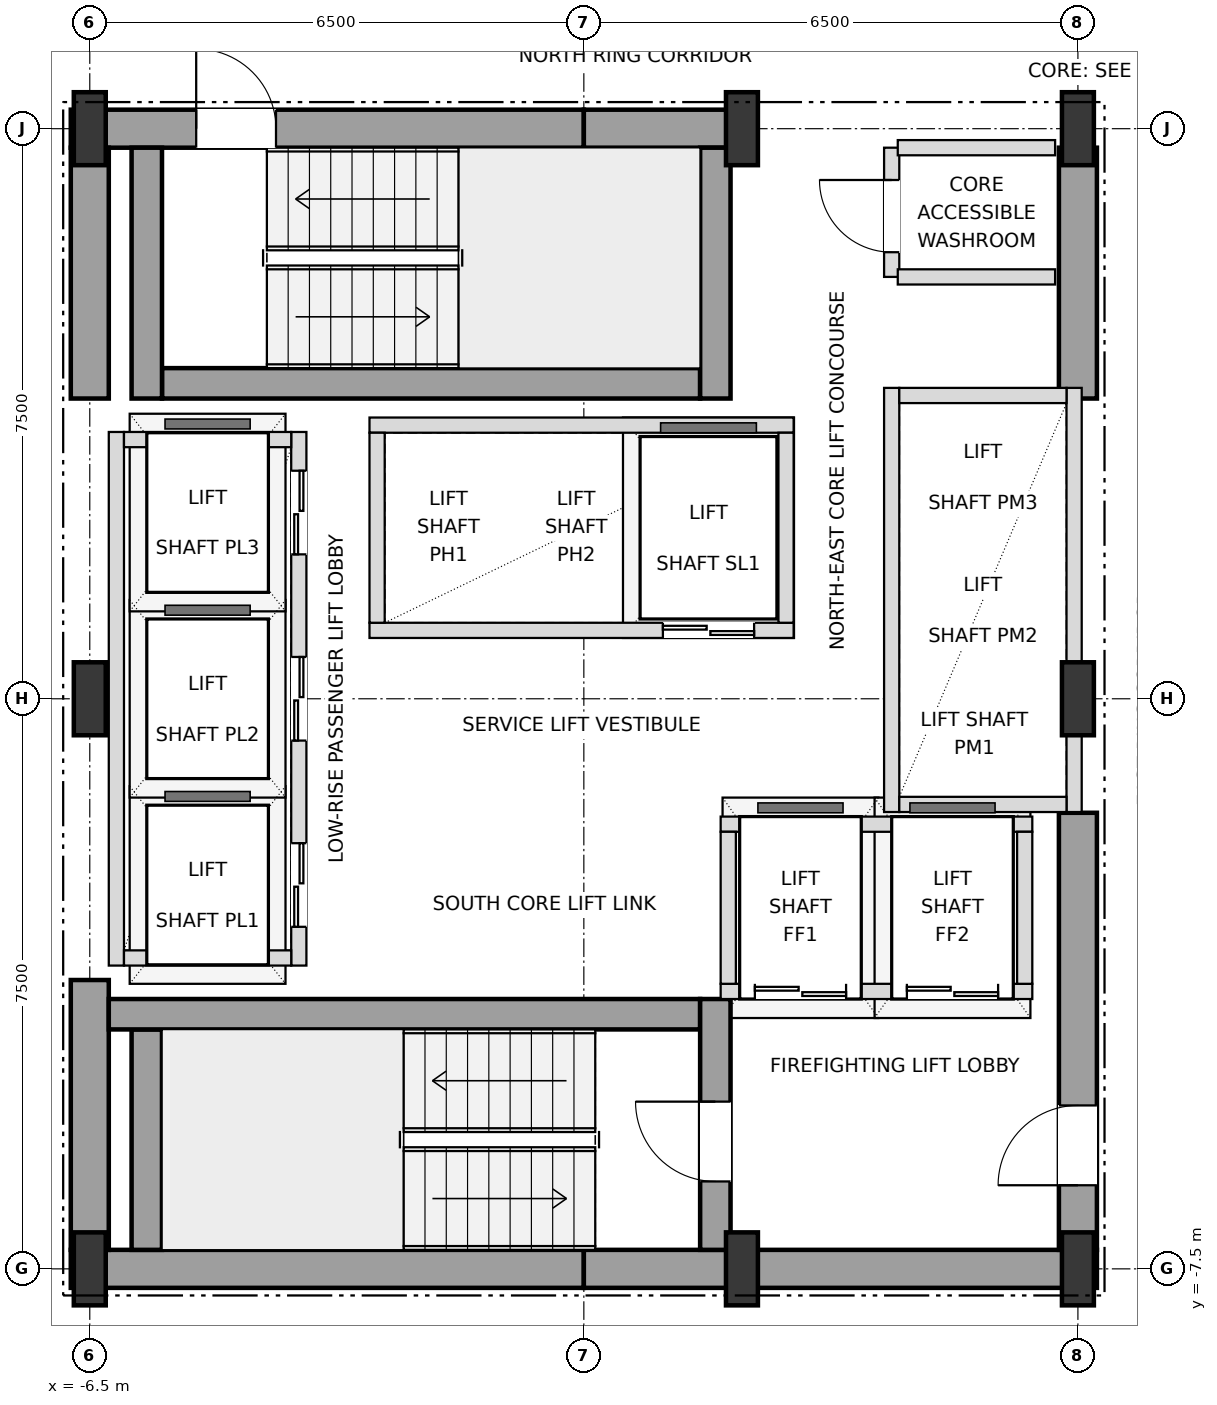
"""IFC4 building model, lengths in metres.
Left out: names, types, materials, properties, quantities, classifications, styles, units other than length and angle.
Written with IfcOpenShell. Run it as: python <this file> out.ifc"""

import sys

from ifc_helpers import new_model, si_unit, direction, frame, frame_2d, origin, origin_2d, place, context, subcontext, project, spatial, rectangle, i_section, extrude, element, fill, save


model = new_model("IFC4")
c1 = context("Model", 3, precision=1e-05, world=origin(), true_north=direction((0.0, 1.0)))
c2 = subcontext(c1, "Body", "Model", "MODEL_VIEW")
j1 = project(units=[si_unit("LENGTHUNIT", "METRE"), si_unit("PLANEANGLEUNIT", "RADIAN")], contexts=[c1])
p1 = place(None, origin())
s1 = spatial("IfcSite", under=j1, at=p1, CompositionType="ELEMENT")
p2 = place(p1, origin())
s2 = spatial("IfcBuilding", under=s1, at=p2, CompositionType="ELEMENT")
p3 = place(p2, frame((0.0, 0.0, 117.0)))
s3 = spatial("IfcBuildingStorey", under=s2, at=p3, CompositionType="ELEMENT", Elevation=117.0)
for number, where, z_axis, x_axis in (
    (1, (-6.5, -7.5, 0.0), (0.0, 0.0, 1.0), (1.0, 0.0, 0.0)),
    (2, (2.08, -7.5, 0.0), (0.0, 0.0, 1.0), (1.0, 0.0, 0.0)),
    (3, (6.5, -7.5, 0.0), (0.0, 0.0, 1.0), (1.0, 0.0, 0.0)),
    (4, (-6.5, 0.0, 0.0), (0.0, 0.0, 1.0), (1.0, 0.0, 0.0)),
    (5, (6.5, 0.0, 0.0), (0.0, 0.0, 1.0), (1.0, 0.0, 0.0)),
    (6, (-6.5, 7.5, 0.0), (0.0, 0.0, 1.0), (1.0, 0.0, 0.0)),
    (7, (2.08, 7.5, 0.0), (0.0, 0.0, 1.0), (1.0, 0.0, 0.0)),
    (8, (6.5, 7.5, 0.0), (0.0, 0.0, 1.0), (1.0, 0.0, 0.0)),
):
    element("IfcColumn", number, at=place(p3, frame(where, z_axis=z_axis, x_axis=x_axis)), inside=s3, PredefinedType="COLUMN", context=c2, shape_type="SweptSolid", body=[
        extrude(i_section(OverallWidth=0.42, OverallDepth=0.96, WebThickness=0.022, FlangeThickness=0.034, at=origin_2d()), origin(), (0.0, 0.0, 1.0), 3.6),
    ])
for number, where, z_axis, x_axis in (
    (9, (-6.75, -7.5, 0.0), (0.0, 0.0, 1.0), (1.0, 0.0, 0.0)),
    (10, (0.0, -7.5, 0.0), (0.0, 0.0, 1.0), (1.0, 0.0, 0.0)),
):
    element("IfcWall", number, at=place(p3, frame(where, z_axis=z_axis, x_axis=x_axis)), inside=s3, PredefinedType="SHEAR", context=c2, shape_type="SweptSolid", body=[
        extrude(rectangle(XDim=6.75, YDim=0.5, at=frame_2d((3.375, 0.0))), origin(), (0.0, 0.0, 1.0), 3.3),
    ])
p4 = place(p3, frame((-6.75, 7.5, 0.0), z_axis=(0.0, 0.0, 1.0), x_axis=(1.0, 0.0, 0.0)))
e11 = element("IfcWall", 11, at=p4, inside=s3, PredefinedType="SHEAR", context=c2, shape_type="SweptSolid", body=[
    extrude(rectangle(XDim=6.75, YDim=0.5, at=frame_2d((3.375, 0.0))), origin(), (0.0, 0.0, 1.0), 3.3),
])
p5 = place(p4, frame((1.65, 0.0, 0.0)))
e12 = element("IfcOpeningElement", 12, at=p5, cuts=e11, PredefinedType="OPENING", context=c2, shape_type="SweptSolid", body=[
    extrude(rectangle(XDim=1.05, YDim=2.15, at=frame_2d((0.525, 1.075))), frame((0.0, 0.26, 0.0), z_axis=(0.0, -1.0, 0.0), x_axis=(1.0, 0.0, 0.0)), (0.0, 0.0, 1.0), 0.52),
])
p6 = place(p3, frame((0.0, 7.5, 0.0), z_axis=(0.0, 0.0, 1.0), x_axis=(1.0, 0.0, 0.0)))
e13 = element("IfcWall", 13, at=p6, inside=s3, PredefinedType="SHEAR", context=c2, shape_type="SweptSolid", body=[
    extrude(rectangle(XDim=2.08, YDim=0.5, at=frame_2d((1.04, 0.0))), origin(), (0.0, 0.0, 1.0), 3.3),
])
p7 = place(p3, frame((-6.5, -7.25, 0.0), z_axis=(0.0, 0.0, 1.0), x_axis=(0.0, 1.0, 0.0)))
e14 = element("IfcWall", 14, at=p7, inside=s3, PredefinedType="SHEAR", context=c2, shape_type="SweptSolid", body=[
    extrude(rectangle(XDim=3.55, YDim=0.5, at=frame_2d((1.775, 0.0))), origin(), (0.0, 0.0, 1.0), 3.3),
])
p8 = place(p3, frame((-6.5, 3.95, 0.0), z_axis=(0.0, 0.0, 1.0), x_axis=(0.0, 1.0, 0.0)))
e15 = element("IfcWall", 15, at=p8, inside=s3, PredefinedType="SHEAR", context=c2, shape_type="SweptSolid", body=[
    extrude(rectangle(XDim=3.3, YDim=0.5, at=frame_2d((1.65, 0.0))), origin(), (0.0, 0.0, 1.0), 3.3),
])
p9 = place(p3, frame((6.5, -7.25, 0.0), z_axis=(0.0, 0.0, 1.0), x_axis=(0.0, 1.0, 0.0)))
e16 = element("IfcWall", 16, at=p9, inside=s3, PredefinedType="SHEAR", context=c2, shape_type="SweptSolid", body=[
    extrude(rectangle(XDim=5.75, YDim=0.5, at=frame_2d((2.875, 0.0))), origin(), (0.0, 0.0, 1.0), 3.3),
])
p10 = place(p9, frame((0.85, 0.0, 0.0)))
e17 = element("IfcOpeningElement", 17, at=p10, cuts=e16, PredefinedType="OPENING", context=c2, shape_type="SweptSolid", body=[
    extrude(rectangle(XDim=1.05, YDim=2.15, at=frame_2d((0.525, 1.075))), frame((0.0, 0.26, 0.0), z_axis=(0.0, -1.0, 0.0), x_axis=(1.0, 0.0, 0.0)), (0.0, 0.0, 1.0), 0.52),
])
p11 = place(p3, frame((6.5, 3.95, 0.0), z_axis=(0.0, 0.0, 1.0), x_axis=(0.0, 1.0, 0.0)))
e18 = element("IfcWall", 18, at=p11, inside=s3, PredefinedType="SHEAR", context=c2, shape_type="SweptSolid", body=[
    extrude(rectangle(XDim=3.3, YDim=0.5, at=frame_2d((1.65, 0.0))), origin(), (0.0, 0.0, 1.0), 3.3),
])
p12 = place(p3, frame((-5.75, -7.25, 0.0), z_axis=(0.0, 0.0, 1.0), x_axis=(0.0, 1.0, 0.0)))
e19 = element("IfcWall", 19, at=p12, inside=s3, PredefinedType="SHEAR", context=c2, shape_type="SweptSolid", body=[
    extrude(rectangle(XDim=2.9, YDim=0.4, at=frame_2d((1.45, 0.0))), origin(), (0.0, 0.0, 1.0), 3.3),
])
p13 = place(p3, frame((-6.25, -4.15, 0.0), z_axis=(0.0, 0.0, 1.0), x_axis=(1.0, 0.0, 0.0)))
e20 = element("IfcWall", 20, at=p13, inside=s3, PredefinedType="SHEAR", context=c2, shape_type="SweptSolid", body=[
    extrude(rectangle(XDim=7.78, YDim=0.4, at=frame_2d((3.89, 0.0))), origin(), (0.0, 0.0, 1.0), 3.3),
])
p14 = place(p3, frame((1.73, -7.25, 0.0), z_axis=(0.0, 0.0, 1.0), x_axis=(0.0, 1.0, 0.0)))
e21 = element("IfcWall", 21, at=p14, inside=s3, PredefinedType="SHEAR", context=c2, shape_type="SweptSolid", body=[
    extrude(rectangle(XDim=3.3, YDim=0.4, at=frame_2d((1.65, 0.0))), origin(), (0.0, 0.0, 1.0), 3.3),
])
p15 = place(p14, frame((0.9, 0.0, 0.0)))
e22 = element("IfcOpeningElement", 22, at=p15, cuts=e21, PredefinedType="OPENING", context=c2, shape_type="SweptSolid", body=[
    extrude(rectangle(XDim=1.05, YDim=2.15, at=frame_2d((0.525, 1.075))), frame((0.0, 0.21, 0.0), z_axis=(0.0, -1.0, 0.0), x_axis=(1.0, 0.0, 0.0)), (0.0, 0.0, 1.0), 0.42),
])
p16 = place(p3, frame((-5.55, 4.15, 0.0), z_axis=(0.0, 0.0, 1.0), x_axis=(1.0, 0.0, 0.0)))
e23 = element("IfcWall", 23, at=p16, inside=s3, PredefinedType="SHEAR", context=c2, shape_type="SweptSolid", body=[
    extrude(rectangle(XDim=7.08, YDim=0.4, at=frame_2d((3.54, 0.0))), origin(), (0.0, 0.0, 1.0), 3.3),
])
for number, where, z_axis, x_axis in (
    (24, (1.73, 3.95, 0.0), (0.0, 0.0, 1.0), (0.0, 1.0, 0.0)),
    (25, (-5.75, 3.95, 0.0), (0.0, 0.0, 1.0), (0.0, 1.0, 0.0)),
):
    element("IfcWall", number, at=place(p3, frame(where, z_axis=z_axis, x_axis=x_axis)), inside=s3, PredefinedType="SHEAR", context=c2, shape_type="SweptSolid", body=[
        extrude(rectangle(XDim=3.3, YDim=0.4, at=frame_2d((1.65, 0.0))), origin(), (0.0, 0.0, 1.0), 3.3),
    ])
p17 = place(p3, frame((-3.75, -3.51, 0.0), z_axis=(0.0, 0.0, 1.0), x_axis=(0.0, 1.0, 0.0)))
e26 = element("IfcWall", 26, at=p17, inside=s3, PredefinedType="SOLIDWALL", context=c2, shape_type="SweptSolid", body=[
    extrude(rectangle(XDim=7.02, YDim=0.2, at=frame_2d((3.51, 0.0))), origin(), (0.0, 0.0, 1.0), 3.3),
])
p18 = place(p17, frame((0.51, 0.0, 0.0)))
e27 = element("IfcOpeningElement", 27, at=p18, cuts=e26, PredefinedType="OPENING", context=c2, shape_type="SweptSolid", body=[
    extrude(rectangle(XDim=1.1, YDim=2.15, at=frame_2d((0.55, 1.075))), frame((0.0, 0.11, 0.0), z_axis=(0.0, -1.0, 0.0), x_axis=(1.0, 0.0, 0.0)), (0.0, 0.0, 1.0), 0.22),
])
p19 = place(p17, frame((2.96, 0.0, 0.0)))
e28 = element("IfcOpeningElement", 28, at=p19, cuts=e26, PredefinedType="OPENING", context=c2, shape_type="SweptSolid", body=[
    extrude(rectangle(XDim=1.1, YDim=2.15, at=frame_2d((0.55, 1.075))), frame((0.0, 0.11, 0.0), z_axis=(0.0, -1.0, 0.0), x_axis=(1.0, 0.0, 0.0)), (0.0, 0.0, 1.0), 0.22),
])
p20 = place(p17, frame((5.41, 0.0, 0.0)))
e29 = element("IfcOpeningElement", 29, at=p20, cuts=e26, PredefinedType="OPENING", context=c2, shape_type="SweptSolid", body=[
    extrude(rectangle(XDim=1.1, YDim=2.15, at=frame_2d((0.55, 1.075))), frame((0.0, 0.11, 0.0), z_axis=(0.0, -1.0, 0.0), x_axis=(1.0, 0.0, 0.0)), (0.0, 0.0, 1.0), 0.22),
])
p21 = place(p3, frame((-6.15, -3.51, 0.0), z_axis=(0.0, 0.0, 1.0), x_axis=(0.0, 1.0, 0.0)))
e30 = element("IfcWall", 30, at=p21, inside=s3, PredefinedType="SOLIDWALL", context=c2, shape_type="SweptSolid", body=[
    extrude(rectangle(XDim=7.02, YDim=0.2, at=frame_2d((3.51, 0.0))), origin(), (0.0, 0.0, 1.0), 3.3),
])
for number, where, z_axis, x_axis in (
    (31, (-6.05, -3.41, 0.0), (0.0, 0.0, 1.0), (1.0, 0.0, 0.0)),
    (32, (-6.05, 3.41, 0.0), (0.0, 0.0, 1.0), (1.0, 0.0, 0.0)),
):
    element("IfcWall", number, at=place(p3, frame(where, z_axis=z_axis, x_axis=x_axis)), inside=s3, PredefinedType="SOLIDWALL", context=c2, shape_type="SweptSolid", body=[
        extrude(rectangle(XDim=2.2, YDim=0.2, at=frame_2d((1.1, 0.0))), origin(), (0.0, 0.0, 1.0), 3.3),
    ])
p22 = place(p3, frame((4.05, -1.49, 0.0), z_axis=(0.0, 0.0, 1.0), x_axis=(0.0, 1.0, 0.0)))
e33 = element("IfcWall", 33, at=p22, inside=s3, PredefinedType="SOLIDWALL", context=c2, shape_type="SweptSolid", body=[
    extrude(rectangle(XDim=5.58, YDim=0.2, at=frame_2d((2.79, 0.0))), origin(), (0.0, 0.0, 1.0), 3.3),
])
p23 = place(p3, frame((6.45, -1.49, 0.0), z_axis=(0.0, 0.0, 1.0), x_axis=(0.0, 1.0, 0.0)))
e34 = element("IfcWall", 34, at=p23, inside=s3, PredefinedType="SOLIDWALL", context=c2, shape_type="SweptSolid", body=[
    extrude(rectangle(XDim=5.58, YDim=0.2, at=frame_2d((2.79, 0.0))), origin(), (0.0, 0.0, 1.0), 2.736),
])
for number, where, z_axis, x_axis in (
    (35, (4.15, -1.39, 0.0), (0.0, 0.0, 1.0), (1.0, 0.0, 0.0)),
    (36, (4.15, 3.99, 0.0), (0.0, 0.0, 1.0), (1.0, 0.0, 0.0)),
):
    element("IfcWall", number, at=place(p3, frame(where, z_axis=z_axis, x_axis=x_axis)), inside=s3, PredefinedType="SOLIDWALL", context=c2, shape_type="SweptSolid", body=[
        extrude(rectangle(XDim=2.2, YDim=0.2, at=frame_2d((1.1, 0.0))), origin(), (0.0, 0.0, 1.0), 3.3),
    ])
p24 = place(p3, frame((-2.82, 0.9, 0.0), z_axis=(0.0, 0.0, 1.0), x_axis=(1.0, 0.0, 0.0)))
e37 = element("IfcWall", 37, at=p24, inside=s3, PredefinedType="SOLIDWALL", context=c2, shape_type="SweptSolid", body=[
    extrude(rectangle(XDim=5.58, YDim=0.2, at=frame_2d((2.79, 0.0))), origin(), (0.0, 0.0, 1.0), 3.3),
])
p25 = place(p24, frame((3.86, 0.0, 0.0)))
e38 = element("IfcOpeningElement", 38, at=p25, cuts=e37, PredefinedType="OPENING", context=c2, shape_type="SweptSolid", body=[
    extrude(rectangle(XDim=1.2, YDim=2.2, at=frame_2d((0.6, 1.1))), frame((0.0, 0.11, 0.0), z_axis=(0.0, -1.0, 0.0), x_axis=(1.0, 0.0, 0.0)), (0.0, 0.0, 1.0), 0.22),
])
p26 = place(p3, frame((-2.82, 3.6, 0.0), z_axis=(0.0, 0.0, 1.0), x_axis=(1.0, 0.0, 0.0)))
e39 = element("IfcWall", 39, at=p26, inside=s3, PredefinedType="SOLIDWALL", context=c2, shape_type="SweptSolid", body=[
    extrude(rectangle(XDim=5.58, YDim=0.2, at=frame_2d((2.79, 0.0))), origin(), (0.0, 0.0, 1.0), 3.3),
])
for number, where, z_axis, x_axis in (
    (40, (-2.72, 1.0, 0.0), (0.0, 0.0, 1.0), (0.0, 1.0, 0.0)),
    (41, (2.66, 1.0, 0.0), (0.0, 0.0, 1.0), (0.0, 1.0, 0.0)),
):
    element("IfcWall", number, at=place(p3, frame(where, z_axis=z_axis, x_axis=x_axis)), inside=s3, PredefinedType="SOLIDWALL", context=c2, shape_type="SweptSolid", body=[
        extrude(rectangle(XDim=2.5, YDim=0.2, at=frame_2d((1.25, 0.0))), origin(), (0.0, 0.0, 1.0), 3.3),
    ])
p27 = place(p3, frame((1.8, -3.85, 0.0), z_axis=(0.0, 0.0, 1.0), x_axis=(1.0, 0.0, 0.0)))
e42 = element("IfcWall", 42, at=p27, inside=s3, PredefinedType="SOLIDWALL", context=c2, shape_type="SweptSolid", body=[
    extrude(rectangle(XDim=4.1, YDim=0.2, at=frame_2d((2.05, 0.0))), origin(), (0.0, 0.0, 1.0), 3.3),
])
p28 = place(p27, frame((0.45, 0.0, 0.0)))
e43 = element("IfcOpeningElement", 43, at=p28, cuts=e42, PredefinedType="OPENING", context=c2, shape_type="SweptSolid", body=[
    extrude(rectangle(XDim=1.2, YDim=2.2, at=frame_2d((0.6, 1.1))), frame((0.0, 0.11, 0.0), z_axis=(0.0, -1.0, 0.0), x_axis=(1.0, 0.0, 0.0)), (0.0, 0.0, 1.0), 0.22),
])
p29 = place(p27, frame((2.45, 0.0, 0.0)))
e44 = element("IfcOpeningElement", 44, at=p29, cuts=e42, PredefinedType="OPENING", context=c2, shape_type="SweptSolid", body=[
    extrude(rectangle(XDim=1.2, YDim=2.2, at=frame_2d((0.6, 1.1))), frame((0.0, 0.11, 0.0), z_axis=(0.0, -1.0, 0.0), x_axis=(1.0, 0.0, 0.0)), (0.0, 0.0, 1.0), 0.22),
])
p30 = place(p3, frame((1.8, -1.65, 0.0), z_axis=(0.0, 0.0, 1.0), x_axis=(1.0, 0.0, 0.0)))
e45 = element("IfcWall", 45, at=p30, inside=s3, PredefinedType="SOLIDWALL", context=c2, shape_type="SweptSolid", body=[
    extrude(rectangle(XDim=4.1, YDim=0.2, at=frame_2d((2.05, 0.0))), origin(), (0.0, 0.0, 1.0), 3.3),
])
for number, where, z_axis, x_axis in (
    (46, (1.9, -3.75, 0.0), (0.0, 0.0, 1.0), (0.0, 1.0, 0.0)),
    (47, (5.8, -3.75, 0.0), (0.0, 0.0, 1.0), (0.0, 1.0, 0.0)),
):
    element("IfcWall", number, at=place(p3, frame(where, z_axis=z_axis, x_axis=x_axis)), inside=s3, PredefinedType="SOLIDWALL", context=c2, shape_type="SweptSolid", body=[
        extrude(rectangle(XDim=2.0, YDim=0.2, at=frame_2d((1.0, 0.0))), origin(), (0.0, 0.0, 1.0), 3.3),
    ])
p31 = place(p3, frame((4.05, 5.55, 0.0), z_axis=(0.0, 0.0, 1.0), x_axis=(0.0, 1.0, 0.0)))
e48 = element("IfcWall", 48, at=p31, inside=s3, PredefinedType="SOLIDWALL", context=c2, shape_type="SweptSolid", body=[
    extrude(rectangle(XDim=1.7, YDim=0.2, at=frame_2d((0.85, 0.0))), origin(), (0.0, 0.0, 1.0), 3.3),
])
p32 = place(p31, frame((0.325, 0.0, 0.0)))
e49 = element("IfcOpeningElement", 49, at=p32, cuts=e48, PredefinedType="OPENING", context=c2, shape_type="SweptSolid", body=[
    extrude(rectangle(XDim=0.95, YDim=2.15, at=frame_2d((0.475, 1.075))), frame((0.0, 0.11, 0.0), z_axis=(0.0, -1.0, 0.0), x_axis=(1.0, 0.0, 0.0)), (0.0, 0.0, 1.0), 0.22),
])
for number, where, z_axis, x_axis in (
    (50, (4.13, 5.55, 0.0), (0.0, 0.0, 1.0), (1.0, 0.0, 0.0)),
    (51, (4.13, 7.25, 0.0), (0.0, 0.0, 1.0), (1.0, 0.0, 0.0)),
):
    element("IfcWall", number, at=place(p3, frame(where, z_axis=z_axis, x_axis=x_axis)), inside=s3, PredefinedType="SOLIDWALL", context=c2, shape_type="SweptSolid", body=[
        extrude(rectangle(XDim=2.07, YDim=0.2, at=frame_2d((1.035, 0.0))), origin(), (0.0, 0.0, 1.0), 3.3),
    ])
p33 = place(p10, origin())
e52 = element("IfcDoor", 52, at=p33, inside=s3, OperationType="SINGLE_SWING_LEFT", PredefinedType="DOOR", context=c2, shape_type="SweptSolid", body=[
    extrude(rectangle(XDim=1.05, YDim=2.15, at=frame_2d((0.525, 1.075))), frame((0.0, 0.025, 0.0), z_axis=(0.0, -1.0, 0.0), x_axis=(1.0, 0.0, 0.0)), (0.0, 0.0, 1.0), 0.05),
])
fill(e17, e52)
p34 = place(p15, origin())
e53 = element("IfcDoor", 53, at=p34, inside=s3, OperationType="SINGLE_SWING_RIGHT", PredefinedType="DOOR", context=c2, shape_type="SweptSolid", body=[
    extrude(rectangle(XDim=1.05, YDim=2.15, at=frame_2d((0.525, 1.075))), frame((0.0, 0.025, 0.0), z_axis=(0.0, -1.0, 0.0), x_axis=(1.0, 0.0, 0.0)), (0.0, 0.0, 1.0), 0.05),
])
fill(e22, e53)
p35 = place(p5, origin())
e54 = element("IfcDoor", 54, at=p35, inside=s3, OperationType="SINGLE_SWING_LEFT", PredefinedType="DOOR", context=c2, shape_type="SweptSolid", body=[
    extrude(rectangle(XDim=1.05, YDim=2.15, at=frame_2d((0.525, 1.075))), frame((0.0, 0.025, 0.0), z_axis=(0.0, -1.0, 0.0), x_axis=(1.0, 0.0, 0.0)), (0.0, 0.0, 1.0), 0.05),
])
fill(e12, e54)
p36 = place(p18, origin())
e55 = element("IfcDoor", 55, at=p36, inside=s3, OperationType="DOUBLE_DOOR_SLIDING", PredefinedType="DOOR", context=c2, shape_type="SweptSolid", body=[
    extrude(rectangle(XDim=1.1, YDim=2.15, at=frame_2d((0.55, 1.075))), frame((0.0, 0.025, 0.0), z_axis=(0.0, -1.0, 0.0), x_axis=(1.0, 0.0, 0.0)), (0.0, 0.0, 1.0), 0.05),
])
fill(e27, e55)
p37 = place(p19, origin())
e56 = element("IfcDoor", 56, at=p37, inside=s3, OperationType="DOUBLE_DOOR_SLIDING", PredefinedType="DOOR", context=c2, shape_type="SweptSolid", body=[
    extrude(rectangle(XDim=1.1, YDim=2.15, at=frame_2d((0.55, 1.075))), frame((0.0, 0.025, 0.0), z_axis=(0.0, -1.0, 0.0), x_axis=(1.0, 0.0, 0.0)), (0.0, 0.0, 1.0), 0.05),
])
fill(e28, e56)
p38 = place(p20, origin())
e57 = element("IfcDoor", 57, at=p38, inside=s3, OperationType="DOUBLE_DOOR_SLIDING", PredefinedType="DOOR", context=c2, shape_type="SweptSolid", body=[
    extrude(rectangle(XDim=1.1, YDim=2.15, at=frame_2d((0.55, 1.075))), frame((0.0, 0.025, 0.0), z_axis=(0.0, -1.0, 0.0), x_axis=(1.0, 0.0, 0.0)), (0.0, 0.0, 1.0), 0.05),
])
fill(e29, e57)
p39 = place(p25, origin())
e58 = element("IfcDoor", 58, at=p39, inside=s3, OperationType="DOUBLE_DOOR_SLIDING", PredefinedType="DOOR", context=c2, shape_type="SweptSolid", body=[
    extrude(rectangle(XDim=1.2, YDim=2.2, at=frame_2d((0.6, 1.1))), frame((0.0, 0.025, 0.0), z_axis=(0.0, -1.0, 0.0), x_axis=(1.0, 0.0, 0.0)), (0.0, 0.0, 1.0), 0.05),
])
fill(e38, e58)
p40 = place(p28, origin())
e59 = element("IfcDoor", 59, at=p40, inside=s3, OperationType="DOUBLE_DOOR_SLIDING", PredefinedType="DOOR", context=c2, shape_type="SweptSolid", body=[
    extrude(rectangle(XDim=1.2, YDim=2.2, at=frame_2d((0.6, 1.1))), frame((0.0, 0.025, 0.0), z_axis=(0.0, -1.0, 0.0), x_axis=(1.0, 0.0, 0.0)), (0.0, 0.0, 1.0), 0.05),
])
fill(e43, e59)
p41 = place(p29, origin())
e60 = element("IfcDoor", 60, at=p41, inside=s3, OperationType="DOUBLE_DOOR_SLIDING", PredefinedType="DOOR", context=c2, shape_type="SweptSolid", body=[
    extrude(rectangle(XDim=1.2, YDim=2.2, at=frame_2d((0.6, 1.1))), frame((0.0, 0.025, 0.0), z_axis=(0.0, -1.0, 0.0), x_axis=(1.0, 0.0, 0.0)), (0.0, 0.0, 1.0), 0.05),
])
fill(e44, e60)
p42 = place(p32, origin())
e61 = element("IfcDoor", 61, at=p42, inside=s3, OperationType="SINGLE_SWING_RIGHT", PredefinedType="DOOR", context=c2, shape_type="SweptSolid", body=[
    extrude(rectangle(XDim=0.95, YDim=2.15, at=frame_2d((0.475, 1.075))), frame((0.0, 0.025, 0.0), z_axis=(0.0, -1.0, 0.0), x_axis=(1.0, 0.0, 0.0)), (0.0, 0.0, 1.0), 0.05),
])
fill(e49, e61)
save(model, sys.argv[1])
